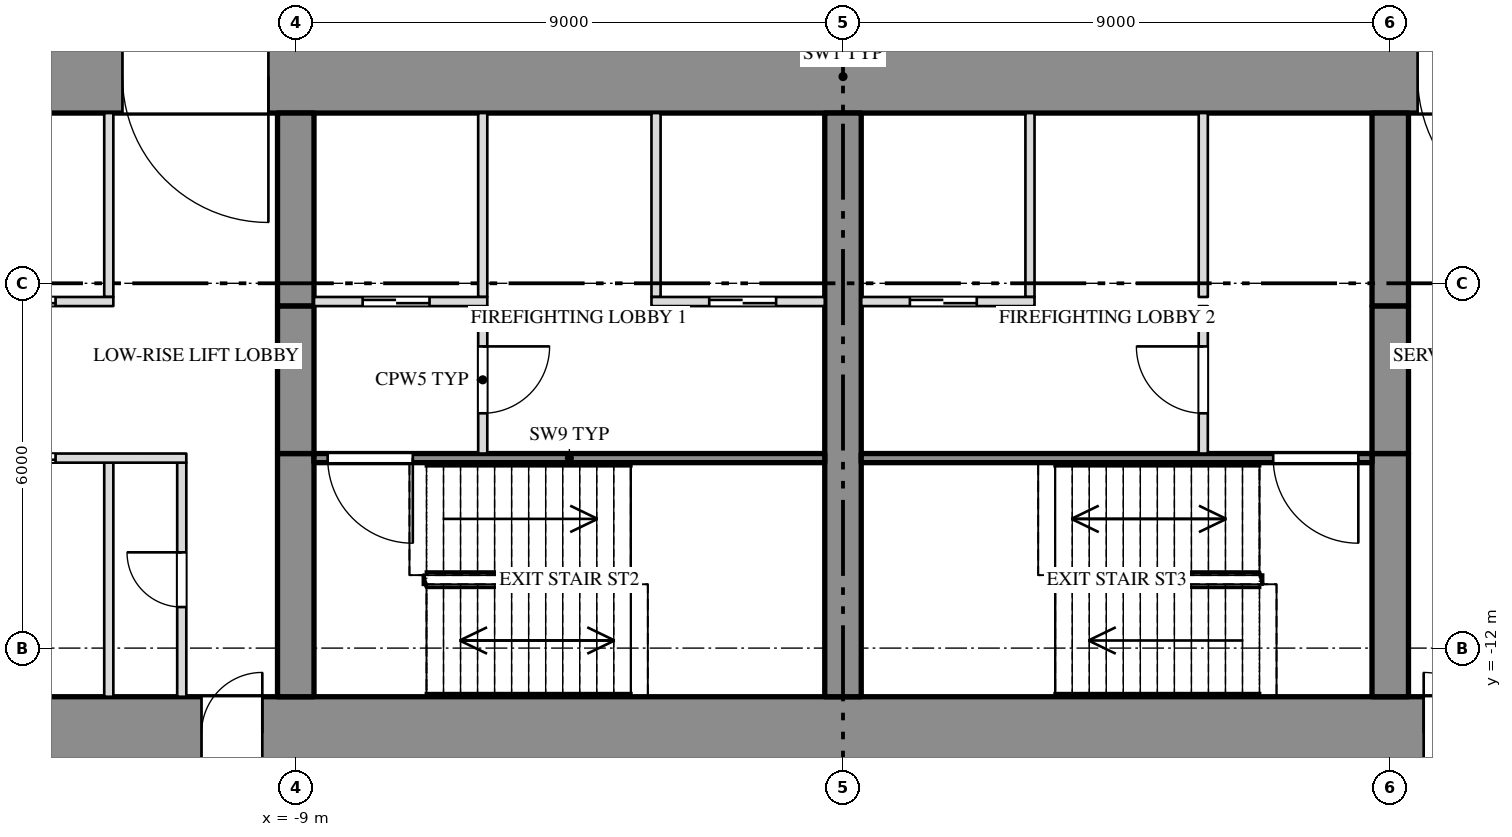
"""IFC4 building model, lengths in metres.
Left out: names, types, materials, properties, quantities, classifications, styles, units other than length and angle.
Written with IfcOpenShell. Run it as: python <this file> out.ifc"""

import sys

from ifc_helpers import new_model, si_unit, direction, frame, frame_2d, origin, place, context, subcontext, project, spatial, rectangle, extrude, element, fill, save


model = new_model("IFC4")
c1 = context("Model", 3, precision=1e-05, world=origin(), true_north=direction((0.0, 1.0)))
c2 = subcontext(c1, "Body", "Model", "MODEL_VIEW")
j1 = project(units=[si_unit("LENGTHUNIT", "METRE"), si_unit("PLANEANGLEUNIT", "RADIAN")], contexts=[c1])
p1 = place(None, origin())
s1 = spatial("IfcSite", under=j1, at=p1, CompositionType="ELEMENT")
p2 = place(p1, origin())
s2 = spatial("IfcBuilding", under=s1, at=p2, CompositionType="ELEMENT")
p3 = place(p2, frame((0.0, 0.0, 48.0)))
s3 = spatial("IfcBuildingStorey", under=s2, at=p3, CompositionType="ELEMENT", Elevation=48.0)
p4 = place(p3, frame((-27.0, -2.6, 0.0), z_axis=(0.0, 0.0, 1.0), x_axis=(1.0, 0.0, 0.0)))
e1 = element("IfcWall", 1, at=p4, inside=s3, PredefinedType="SHEAR", context=c2, shape_type="SweptSolid", body=[
    extrude(rectangle(XDim=54.0, YDim=1.2, at=frame_2d((27.0, 0.0))), origin(), (0.0, 0.0, 1.0), 4.3),
])
p5 = place(p4, frame((15.15, 0.0, 0.0)))
e2 = element("IfcOpeningElement", 2, at=p5, cuts=e1, PredefinedType="OPENING", context=c2, shape_type="SweptSolid", body=[
    extrude(rectangle(XDim=2.4, YDim=2.1, at=frame_2d((1.2, 1.05))), frame((0.0, 0.612, 0.0), z_axis=(0.0, -1.0, 0.0), x_axis=(1.0, 0.0, 0.0)), (0.0, 0.0, 1.0), 1.224),
])
p6 = place(p4, frame((36.45, 0.0, 0.0)))
e3 = element("IfcOpeningElement", 3, at=p6, cuts=e1, PredefinedType="OPENING", context=c2, shape_type="SweptSolid", body=[
    extrude(rectangle(XDim=2.4, YDim=2.1, at=frame_2d((1.2, 1.05))), frame((0.0, 0.612, 0.0), z_axis=(0.0, -1.0, 0.0), x_axis=(1.0, 0.0, 0.0)), (0.0, 0.0, 1.0), 1.224),
])
p7 = place(p3, frame((-27.0, -13.4, 0.0), z_axis=(0.0, 0.0, 1.0), x_axis=(1.0, 0.0, 0.0)))
e4 = element("IfcWall", 4, at=p7, inside=s3, PredefinedType="SHEAR", context=c2, shape_type="SweptSolid", body=[
    extrude(rectangle(XDim=54.0, YDim=1.2, at=frame_2d((27.0, 0.0))), origin(), (0.0, 0.0, 1.0), 4.3),
])
p8 = place(p7, frame((16.45, 0.0, 0.0)))
e5 = element("IfcOpeningElement", 5, at=p8, cuts=e4, PredefinedType="OPENING", context=c2, shape_type="SweptSolid", body=[
    extrude(rectangle(XDim=1.0, YDim=2.1, at=frame_2d((0.5, 1.05))), frame((0.0, 0.612, 0.0), z_axis=(0.0, -1.0, 0.0), x_axis=(1.0, 0.0, 0.0)), (0.0, 0.0, 1.0), 1.224),
])
p9 = place(p7, frame((36.55, 0.0, 0.0)))
e6 = element("IfcOpeningElement", 6, at=p9, cuts=e4, PredefinedType="OPENING", context=c2, shape_type="SweptSolid", body=[
    extrude(rectangle(XDim=1.0, YDim=2.1, at=frame_2d((0.5, 1.05))), frame((0.0, 0.612, 0.0), z_axis=(0.0, -1.0, 0.0), x_axis=(1.0, 0.0, 0.0)), (0.0, 0.0, 1.0), 1.224),
])
p10 = place(p3, frame((-9.0, -12.8, 0.0), z_axis=(0.0, 0.0, 1.0), x_axis=(0.0, 1.0, 0.0)))
e7 = element("IfcWall", 7, at=p10, inside=s3, PredefinedType="SHEAR", context=c2, shape_type="SweptSolid", body=[
    extrude(rectangle(XDim=4.0, YDim=0.6, at=frame_2d((2.0, 0.0))), origin(), (0.0, 0.0, 1.0), 4.3),
])
p11 = place(p3, frame((-9.0, -6.375, 0.0), z_axis=(0.0, 0.0, 1.0), x_axis=(0.0, 1.0, 0.0)))
e8 = element("IfcWall", 8, at=p11, inside=s3, PredefinedType="SHEAR", context=c2, shape_type="SweptSolid", body=[
    extrude(rectangle(XDim=3.175, YDim=0.6, at=frame_2d((1.587, 0.0))), origin(), (0.0, 0.0, 1.0), 4.3),
])
p12 = place(p3, frame((-9.0, -8.8, 3.6), z_axis=(0.0, 0.0, 1.0), x_axis=(0.0, 1.0, 0.0)))
e9 = element("IfcWall", 9, at=p12, inside=s3, PredefinedType="SHEAR", context=c2, shape_type="SweptSolid", body=[
    extrude(rectangle(XDim=2.425, YDim=0.6, at=frame_2d((1.212, 0.0))), origin(), (0.0, 0.0, 1.0), 0.7),
])
p13 = place(p3, frame((0.0, -12.8, 0.0), z_axis=(0.0, 0.0, 1.0), x_axis=(0.0, 1.0, 0.0)))
e10 = element("IfcWall", 10, at=p13, inside=s3, PredefinedType="SHEAR", context=c2, shape_type="SweptSolid", body=[
    extrude(rectangle(XDim=9.6, YDim=0.6, at=frame_2d((4.8, 0.0))), origin(), (0.0, 0.0, 1.0), 4.3),
])
p14 = place(p3, frame((9.0, -12.8, 0.0), z_axis=(0.0, 0.0, 1.0), x_axis=(0.0, 1.0, 0.0)))
e11 = element("IfcWall", 11, at=p14, inside=s3, PredefinedType="SHEAR", context=c2, shape_type="SweptSolid", body=[
    extrude(rectangle(XDim=4.0, YDim=0.6, at=frame_2d((2.0, 0.0))), origin(), (0.0, 0.0, 1.0), 4.3),
])
p15 = place(p3, frame((9.0, -6.375, 0.0), z_axis=(0.0, 0.0, 1.0), x_axis=(0.0, 1.0, 0.0)))
e12 = element("IfcWall", 12, at=p15, inside=s3, PredefinedType="SHEAR", context=c2, shape_type="SweptSolid", body=[
    extrude(rectangle(XDim=3.175, YDim=0.6, at=frame_2d((1.587, 0.0))), origin(), (0.0, 0.0, 1.0), 4.3),
])
p16 = place(p3, frame((9.0, -8.8, 3.6), z_axis=(0.0, 0.0, 1.0), x_axis=(0.0, 1.0, 0.0)))
e13 = element("IfcWall", 13, at=p16, inside=s3, PredefinedType="SHEAR", context=c2, shape_type="SweptSolid", body=[
    extrude(rectangle(XDim=2.425, YDim=0.6, at=frame_2d((1.212, 0.0))), origin(), (0.0, 0.0, 1.0), 0.7),
])
for number, where, z_axis, x_axis in (
    (14, (-12.075, -6.225, 0.0), (0.0, 0.0, 1.0), (0.0, 1.0, 0.0)),
    (15, (-3.075, -6.225, 0.0), (0.0, 0.0, 1.0), (0.0, 1.0, 0.0)),
    (16, (-5.925, -6.225, 0.0), (0.0, 0.0, 1.0), (0.0, 1.0, 0.0)),
    (17, (3.075, -6.225, 0.0), (0.0, 0.0, 1.0), (0.0, 1.0, 0.0)),
    (18, (5.925, -6.225, 0.0), (0.0, 0.0, 1.0), (0.0, 1.0, 0.0)),
):
    element("IfcWall", number, at=place(p3, frame(where, z_axis=z_axis, x_axis=x_axis)), inside=s3, PredefinedType="PARTITIONING", context=c2, shape_type="SweptSolid", body=[
        extrude(rectangle(XDim=3.025, YDim=0.15, at=frame_2d((1.513, 0.0))), origin(), (0.0, 0.0, 1.0), 4.3),
    ])
p17 = place(p3, frame((-10.875, -12.8, 0.0), z_axis=(0.0, 0.0, 1.0), x_axis=(0.0, 1.0, 0.0)))
e19 = element("IfcWall", 19, at=p17, inside=s3, PredefinedType="PARTITIONING", context=c2, shape_type="SweptSolid", body=[
    extrude(rectangle(XDim=3.85, YDim=0.15, at=frame_2d((1.925, 0.0))), origin(), (0.0, 0.0, 1.0), 4.3),
])
p18 = place(p17, frame((1.475, 0.0, 0.0)))
e20 = element("IfcOpeningElement", 20, at=p18, cuts=e19, PredefinedType="OPENING", context=c2, shape_type="SweptSolid", body=[
    extrude(rectangle(XDim=0.9, YDim=2.1, at=frame_2d((0.45, 1.05))), frame((0.0, 0.087, 0.0), z_axis=(0.0, -1.0, 0.0), x_axis=(1.0, 0.0, 0.0)), (0.0, 0.0, 1.0), 0.174),
])
p19 = place(p3, frame((-12.075, -12.8, 0.0), z_axis=(0.0, 0.0, 1.0), x_axis=(0.0, 1.0, 0.0)))
e21 = element("IfcWall", 21, at=p19, inside=s3, PredefinedType="PARTITIONING", context=c2, shape_type="SweptSolid", body=[
    extrude(rectangle(XDim=3.85, YDim=0.15, at=frame_2d((1.925, 0.0))), origin(), (0.0, 0.0, 1.0), 4.3),
])
p20 = place(p3, frame((-5.925, -8.8, 0.0), z_axis=(0.0, 0.0, 1.0), x_axis=(0.0, 1.0, 0.0)))
e22 = element("IfcWall", 22, at=p20, inside=s3, PredefinedType="PARTITIONING", context=c2, shape_type="SweptSolid", body=[
    extrude(rectangle(XDim=2.425, YDim=0.15, at=frame_2d((1.212, 0.0))), origin(), (0.0, 0.0, 1.0), 4.3),
])
p21 = place(p20, frame((0.662, 0.0, 0.0)))
e23 = element("IfcOpeningElement", 23, at=p21, cuts=e22, PredefinedType="OPENING", context=c2, shape_type="SweptSolid", body=[
    extrude(rectangle(XDim=1.1, YDim=2.1, at=frame_2d((0.55, 1.05))), frame((0.0, 0.087, 0.0), z_axis=(0.0, -1.0, 0.0), x_axis=(1.0, 0.0, 0.0)), (0.0, 0.0, 1.0), 0.174),
])
p22 = place(p3, frame((5.925, -8.8, 0.0), z_axis=(0.0, 0.0, 1.0), x_axis=(0.0, 1.0, 0.0)))
e24 = element("IfcWall", 24, at=p22, inside=s3, PredefinedType="PARTITIONING", context=c2, shape_type="SweptSolid", body=[
    extrude(rectangle(XDim=2.425, YDim=0.15, at=frame_2d((1.212, 0.0))), origin(), (0.0, 0.0, 1.0), 4.3),
])
p23 = place(p22, frame((0.662, 0.0, 0.0)))
e25 = element("IfcOpeningElement", 25, at=p23, cuts=e24, PredefinedType="OPENING", context=c2, shape_type="SweptSolid", body=[
    extrude(rectangle(XDim=1.1, YDim=2.1, at=frame_2d((0.55, 1.05))), frame((0.0, 0.087, 0.0), z_axis=(0.0, -1.0, 0.0), x_axis=(1.0, 0.0, 0.0)), (0.0, 0.0, 1.0), 0.174),
])
p24 = place(p3, frame((-17.7, -6.3, 0.0), z_axis=(0.0, 0.0, 1.0), x_axis=(1.0, 0.0, 0.0)))
e26 = element("IfcWall", 26, at=p24, inside=s3, PredefinedType="PARTITIONING", context=c2, shape_type="SweptSolid", body=[
    extrude(rectangle(XDim=5.7, YDim=0.15, at=frame_2d((2.85, 0.0))), origin(), (0.0, 0.0, 1.0), 4.3),
])
p25 = place(p24, frame((0.8, 0.0, 0.0)))
e27 = element("IfcOpeningElement", 27, at=p25, cuts=e26, PredefinedType="OPENING", context=c2, shape_type="SweptSolid", body=[
    extrude(rectangle(XDim=1.1, YDim=2.1, at=frame_2d((0.55, 1.05))), frame((0.0, 0.087, 0.0), z_axis=(0.0, -1.0, 0.0), x_axis=(1.0, 0.0, 0.0)), (0.0, 0.0, 1.0), 0.174),
])
p26 = place(p24, frame((3.65, 0.0, 0.0)))
e28 = element("IfcOpeningElement", 28, at=p26, cuts=e26, PredefinedType="OPENING", context=c2, shape_type="SweptSolid", body=[
    extrude(rectangle(XDim=1.1, YDim=2.1, at=frame_2d((0.55, 1.05))), frame((0.0, 0.087, 0.0), z_axis=(0.0, -1.0, 0.0), x_axis=(1.0, 0.0, 0.0)), (0.0, 0.0, 1.0), 0.174),
])
p27 = place(p3, frame((-8.7, -6.3, 0.0), z_axis=(0.0, 0.0, 1.0), x_axis=(1.0, 0.0, 0.0)))
e29 = element("IfcWall", 29, at=p27, inside=s3, PredefinedType="PARTITIONING", context=c2, shape_type="SweptSolid", body=[
    extrude(rectangle(XDim=2.85, YDim=0.15, at=frame_2d((1.425, 0.0))), origin(), (0.0, 0.0, 1.0), 4.3),
])
p28 = place(p27, frame((0.8, 0.0, 0.0)))
e30 = element("IfcOpeningElement", 30, at=p28, cuts=e29, PredefinedType="OPENING", context=c2, shape_type="SweptSolid", body=[
    extrude(rectangle(XDim=1.1, YDim=2.1, at=frame_2d((0.55, 1.05))), frame((0.0, 0.087, 0.0), z_axis=(0.0, -1.0, 0.0), x_axis=(1.0, 0.0, 0.0)), (0.0, 0.0, 1.0), 0.174),
])
p29 = place(p3, frame((-3.15, -6.3, 0.0), z_axis=(0.0, 0.0, 1.0), x_axis=(1.0, 0.0, 0.0)))
e31 = element("IfcWall", 31, at=p29, inside=s3, PredefinedType="PARTITIONING", context=c2, shape_type="SweptSolid", body=[
    extrude(rectangle(XDim=2.85, YDim=0.15, at=frame_2d((1.425, 0.0))), origin(), (0.0, 0.0, 1.0), 4.3),
])
p30 = place(p29, frame((0.95, 0.0, 0.0)))
e32 = element("IfcOpeningElement", 32, at=p30, cuts=e31, PredefinedType="OPENING", context=c2, shape_type="SweptSolid", body=[
    extrude(rectangle(XDim=1.1, YDim=2.1, at=frame_2d((0.55, 1.05))), frame((0.0, 0.087, 0.0), z_axis=(0.0, -1.0, 0.0), x_axis=(1.0, 0.0, 0.0)), (0.0, 0.0, 1.0), 0.174),
])
p31 = place(p3, frame((0.3, -6.3, 0.0), z_axis=(0.0, 0.0, 1.0), x_axis=(1.0, 0.0, 0.0)))
e33 = element("IfcWall", 33, at=p31, inside=s3, PredefinedType="PARTITIONING", context=c2, shape_type="SweptSolid", body=[
    extrude(rectangle(XDim=2.85, YDim=0.15, at=frame_2d((1.425, 0.0))), origin(), (0.0, 0.0, 1.0), 4.3),
])
p32 = place(p31, frame((0.8, 0.0, 0.0)))
e34 = element("IfcOpeningElement", 34, at=p32, cuts=e33, PredefinedType="OPENING", context=c2, shape_type="SweptSolid", body=[
    extrude(rectangle(XDim=1.1, YDim=2.1, at=frame_2d((0.55, 1.05))), frame((0.0, 0.087, 0.0), z_axis=(0.0, -1.0, 0.0), x_axis=(1.0, 0.0, 0.0)), (0.0, 0.0, 1.0), 0.174),
])
p33 = place(p3, frame((-17.7, -8.875, 0.0), z_axis=(0.0, 0.0, 1.0), x_axis=(1.0, 0.0, 0.0)))
e35 = element("IfcWall", 35, at=p33, inside=s3, PredefinedType="PARTITIONING", context=c2, shape_type="SweptSolid", body=[
    extrude(rectangle(XDim=6.9, YDim=0.15, at=frame_2d((3.45, 0.0))), origin(), (0.0, 0.0, 1.0), 4.3),
])
p34 = place(p33, frame((0.8, 0.0, 0.0)))
e36 = element("IfcOpeningElement", 36, at=p34, cuts=e35, PredefinedType="OPENING", context=c2, shape_type="SweptSolid", body=[
    extrude(rectangle(XDim=1.1, YDim=2.1, at=frame_2d((0.55, 1.05))), frame((0.0, 0.087, 0.0), z_axis=(0.0, -1.0, 0.0), x_axis=(1.0, 0.0, 0.0)), (0.0, 0.0, 1.0), 0.174),
])
p35 = place(p33, frame((3.65, 0.0, 0.0)))
e37 = element("IfcOpeningElement", 37, at=p35, cuts=e35, PredefinedType="OPENING", context=c2, shape_type="SweptSolid", body=[
    extrude(rectangle(XDim=1.1, YDim=2.1, at=frame_2d((0.55, 1.05))), frame((0.0, 0.087, 0.0), z_axis=(0.0, -1.0, 0.0), x_axis=(1.0, 0.0, 0.0)), (0.0, 0.0, 1.0), 0.174),
])
p36 = place(p3, frame((-8.7, -8.875, 0.0), z_axis=(0.0, 0.0, 1.0), x_axis=(1.0, 0.0, 0.0)))
e38 = element("IfcWall", 38, at=p36, inside=s3, PredefinedType="SHEAR", context=c2, shape_type="SweptSolid", body=[
    extrude(rectangle(XDim=8.4, YDim=0.15, at=frame_2d((4.2, 0.0))), origin(), (0.0, 0.0, 1.0), 4.3),
])
p37 = place(p36, frame((0.225, 0.0, 0.0)))
e39 = element("IfcOpeningElement", 39, at=p37, cuts=e38, PredefinedType="OPENING", context=c2, shape_type="SweptSolid", body=[
    extrude(rectangle(XDim=1.4, YDim=2.1, at=frame_2d((0.7, 1.05))), frame((0.0, 0.087, 0.0), z_axis=(0.0, -1.0, 0.0), x_axis=(1.0, 0.0, 0.0)), (0.0, 0.0, 1.0), 0.174),
])
p38 = place(p3, frame((0.3, -8.875, 0.0), z_axis=(0.0, 0.0, 1.0), x_axis=(1.0, 0.0, 0.0)))
e40 = element("IfcWall", 40, at=p38, inside=s3, PredefinedType="SHEAR", context=c2, shape_type="SweptSolid", body=[
    extrude(rectangle(XDim=8.4, YDim=0.15, at=frame_2d((4.2, 0.0))), origin(), (0.0, 0.0, 1.0), 4.3),
])
p39 = place(p38, frame((6.775, 0.0, 0.0)))
e41 = element("IfcOpeningElement", 41, at=p39, cuts=e40, PredefinedType="OPENING", context=c2, shape_type="SweptSolid", body=[
    extrude(rectangle(XDim=1.4, YDim=2.1, at=frame_2d((0.7, 1.05))), frame((0.0, 0.087, 0.0), z_axis=(0.0, -1.0, 0.0), x_axis=(1.0, 0.0, 0.0)), (0.0, 0.0, 1.0), 0.174),
])
p40 = place(p35, origin())
e42 = element("IfcDoor", 42, at=p40, inside=s3, OperationType="SLIDING_TO_RIGHT", PredefinedType="DOOR", context=c2, shape_type="SweptSolid", body=[
    extrude(rectangle(XDim=1.1, YDim=2.1, at=frame_2d((0.55, 1.05))), frame((0.0, 0.025, 0.0), z_axis=(0.0, -1.0, 0.0), x_axis=(1.0, 0.0, 0.0)), (0.0, 0.0, 1.0), 0.05),
])
fill(e37, e42)
p41 = place(p26, origin())
e43 = element("IfcDoor", 43, at=p41, inside=s3, OperationType="SLIDING_TO_LEFT", PredefinedType="DOOR", context=c2, shape_type="SweptSolid", body=[
    extrude(rectangle(XDim=1.1, YDim=2.1, at=frame_2d((0.55, 1.05))), frame((0.0, 0.025, 0.0), z_axis=(0.0, -1.0, 0.0), x_axis=(1.0, 0.0, 0.0)), (0.0, 0.0, 1.0), 0.05),
])
fill(e28, e43)
p42 = place(p18, origin())
e44 = element("IfcDoor", 44, at=p42, inside=s3, OperationType="SINGLE_SWING_RIGHT", PredefinedType="DOOR", context=c2, shape_type="SweptSolid", body=[
    extrude(rectangle(XDim=0.9, YDim=2.1, at=frame_2d((0.45, 1.05))), frame((0.0, 0.025, 0.0), z_axis=(0.0, -1.0, 0.0), x_axis=(1.0, 0.0, 0.0)), (0.0, 0.0, 1.0), 0.05),
])
fill(e20, e44)
p43 = place(p5, origin())
e45 = element("IfcDoor", 45, at=p43, inside=s3, OperationType="DOUBLE_DOOR_SINGLE_SWING", PredefinedType="DOOR", context=c2, shape_type="SweptSolid", body=[
    extrude(rectangle(XDim=2.4, YDim=2.1, at=frame_2d((1.2, 1.05))), frame((0.0, 0.025, 0.0), z_axis=(0.0, -1.0, 0.0), x_axis=(1.0, 0.0, 0.0)), (0.0, 0.0, 1.0), 0.05),
])
fill(e2, e45)
p44 = place(p8, origin())
e46 = element("IfcDoor", 46, at=p44, inside=s3, OperationType="SINGLE_SWING_RIGHT", PredefinedType="DOOR", context=c2, shape_type="SweptSolid", body=[
    extrude(rectangle(XDim=1.0, YDim=2.1, at=frame_2d((0.5, 1.05))), frame((0.0, 0.025, 0.0), z_axis=(0.0, -1.0, 0.0), x_axis=(1.0, 0.0, 0.0)), (0.0, 0.0, 1.0), 0.05),
])
fill(e5, e46)
p45 = place(p37, origin())
e47 = element("IfcDoor", 47, at=p45, inside=s3, OperationType="DOUBLE_DOOR_SINGLE_SWING", PredefinedType="DOOR", context=c2, shape_type="SweptSolid", body=[
    extrude(rectangle(XDim=1.4, YDim=2.1, at=frame_2d((0.7, 1.05))), frame((0.0, 0.025, 0.0), z_axis=(0.0, -1.0, 0.0), x_axis=(1.0, 0.0, 0.0)), (0.0, 0.0, 1.0), 0.05),
])
fill(e39, e47)
p46 = place(p28, origin())
e48 = element("IfcDoor", 48, at=p46, inside=s3, OperationType="SLIDING_TO_RIGHT", PredefinedType="DOOR", context=c2, shape_type="SweptSolid", body=[
    extrude(rectangle(XDim=1.1, YDim=2.1, at=frame_2d((0.55, 1.05))), frame((0.0, 0.025, 0.0), z_axis=(0.0, -1.0, 0.0), x_axis=(1.0, 0.0, 0.0)), (0.0, 0.0, 1.0), 0.05),
])
fill(e30, e48)
p47 = place(p21, origin())
e49 = element("IfcDoor", 49, at=p47, inside=s3, OperationType="SINGLE_SWING_LEFT", PredefinedType="DOOR", context=c2, shape_type="SweptSolid", body=[
    extrude(rectangle(XDim=1.1, YDim=2.1, at=frame_2d((0.55, 1.05))), frame((0.0, 0.025, 0.0), z_axis=(0.0, -1.0, 0.0), x_axis=(1.0, 0.0, 0.0)), (0.0, 0.0, 1.0), 0.05),
])
fill(e23, e49)
p48 = place(p30, origin())
e50 = element("IfcDoor", 50, at=p48, inside=s3, OperationType="SLIDING_TO_RIGHT", PredefinedType="DOOR", context=c2, shape_type="SweptSolid", body=[
    extrude(rectangle(XDim=1.1, YDim=2.1, at=frame_2d((0.55, 1.05))), frame((0.0, 0.025, 0.0), z_axis=(0.0, -1.0, 0.0), x_axis=(1.0, 0.0, 0.0)), (0.0, 0.0, 1.0), 0.05),
])
fill(e32, e50)
p49 = place(p32, origin())
e51 = element("IfcDoor", 51, at=p49, inside=s3, OperationType="SLIDING_TO_LEFT", PredefinedType="DOOR", context=c2, shape_type="SweptSolid", body=[
    extrude(rectangle(XDim=1.1, YDim=2.1, at=frame_2d((0.55, 1.05))), frame((0.0, 0.025, 0.0), z_axis=(0.0, -1.0, 0.0), x_axis=(1.0, 0.0, 0.0)), (0.0, 0.0, 1.0), 0.05),
])
fill(e34, e51)
p50 = place(p23, origin())
e52 = element("IfcDoor", 52, at=p50, inside=s3, OperationType="SINGLE_SWING_RIGHT", PredefinedType="DOOR", context=c2, shape_type="SweptSolid", body=[
    extrude(rectangle(XDim=1.1, YDim=2.1, at=frame_2d((0.55, 1.05))), frame((0.0, 0.025, 0.0), z_axis=(0.0, -1.0, 0.0), x_axis=(1.0, 0.0, 0.0)), (0.0, 0.0, 1.0), 0.05),
])
fill(e25, e52)
p51 = place(p39, origin())
e53 = element("IfcDoor", 53, at=p51, inside=s3, OperationType="DOUBLE_DOOR_SINGLE_SWING", PredefinedType="DOOR", context=c2, shape_type="SweptSolid", body=[
    extrude(rectangle(XDim=1.4, YDim=2.1, at=frame_2d((0.7, 1.05))), frame((0.0, 0.025, 0.0), z_axis=(0.0, -1.0, 0.0), x_axis=(1.0, 0.0, 0.0)), (0.0, 0.0, 1.0), 0.05),
])
fill(e41, e53)
p52 = place(p9, origin())
e54 = element("IfcDoor", 54, at=p52, inside=s3, OperationType="SINGLE_SWING_LEFT", PredefinedType="DOOR", context=c2, shape_type="SweptSolid", body=[
    extrude(rectangle(XDim=1.0, YDim=2.1, at=frame_2d((0.5, 1.05))), frame((0.0, 0.025, 0.0), z_axis=(0.0, -1.0, 0.0), x_axis=(1.0, 0.0, 0.0)), (0.0, 0.0, 1.0), 0.05),
])
fill(e6, e54)
p53 = place(p6, origin())
e55 = element("IfcDoor", 55, at=p53, inside=s3, OperationType="DOUBLE_DOOR_SINGLE_SWING", PredefinedType="DOOR", context=c2, shape_type="SweptSolid", body=[
    extrude(rectangle(XDim=2.4, YDim=2.1, at=frame_2d((1.2, 1.05))), frame((0.0, 0.025, 0.0), z_axis=(0.0, -1.0, 0.0), x_axis=(1.0, 0.0, 0.0)), (0.0, 0.0, 1.0), 0.05),
])
fill(e3, e55)
save(model, sys.argv[1])
